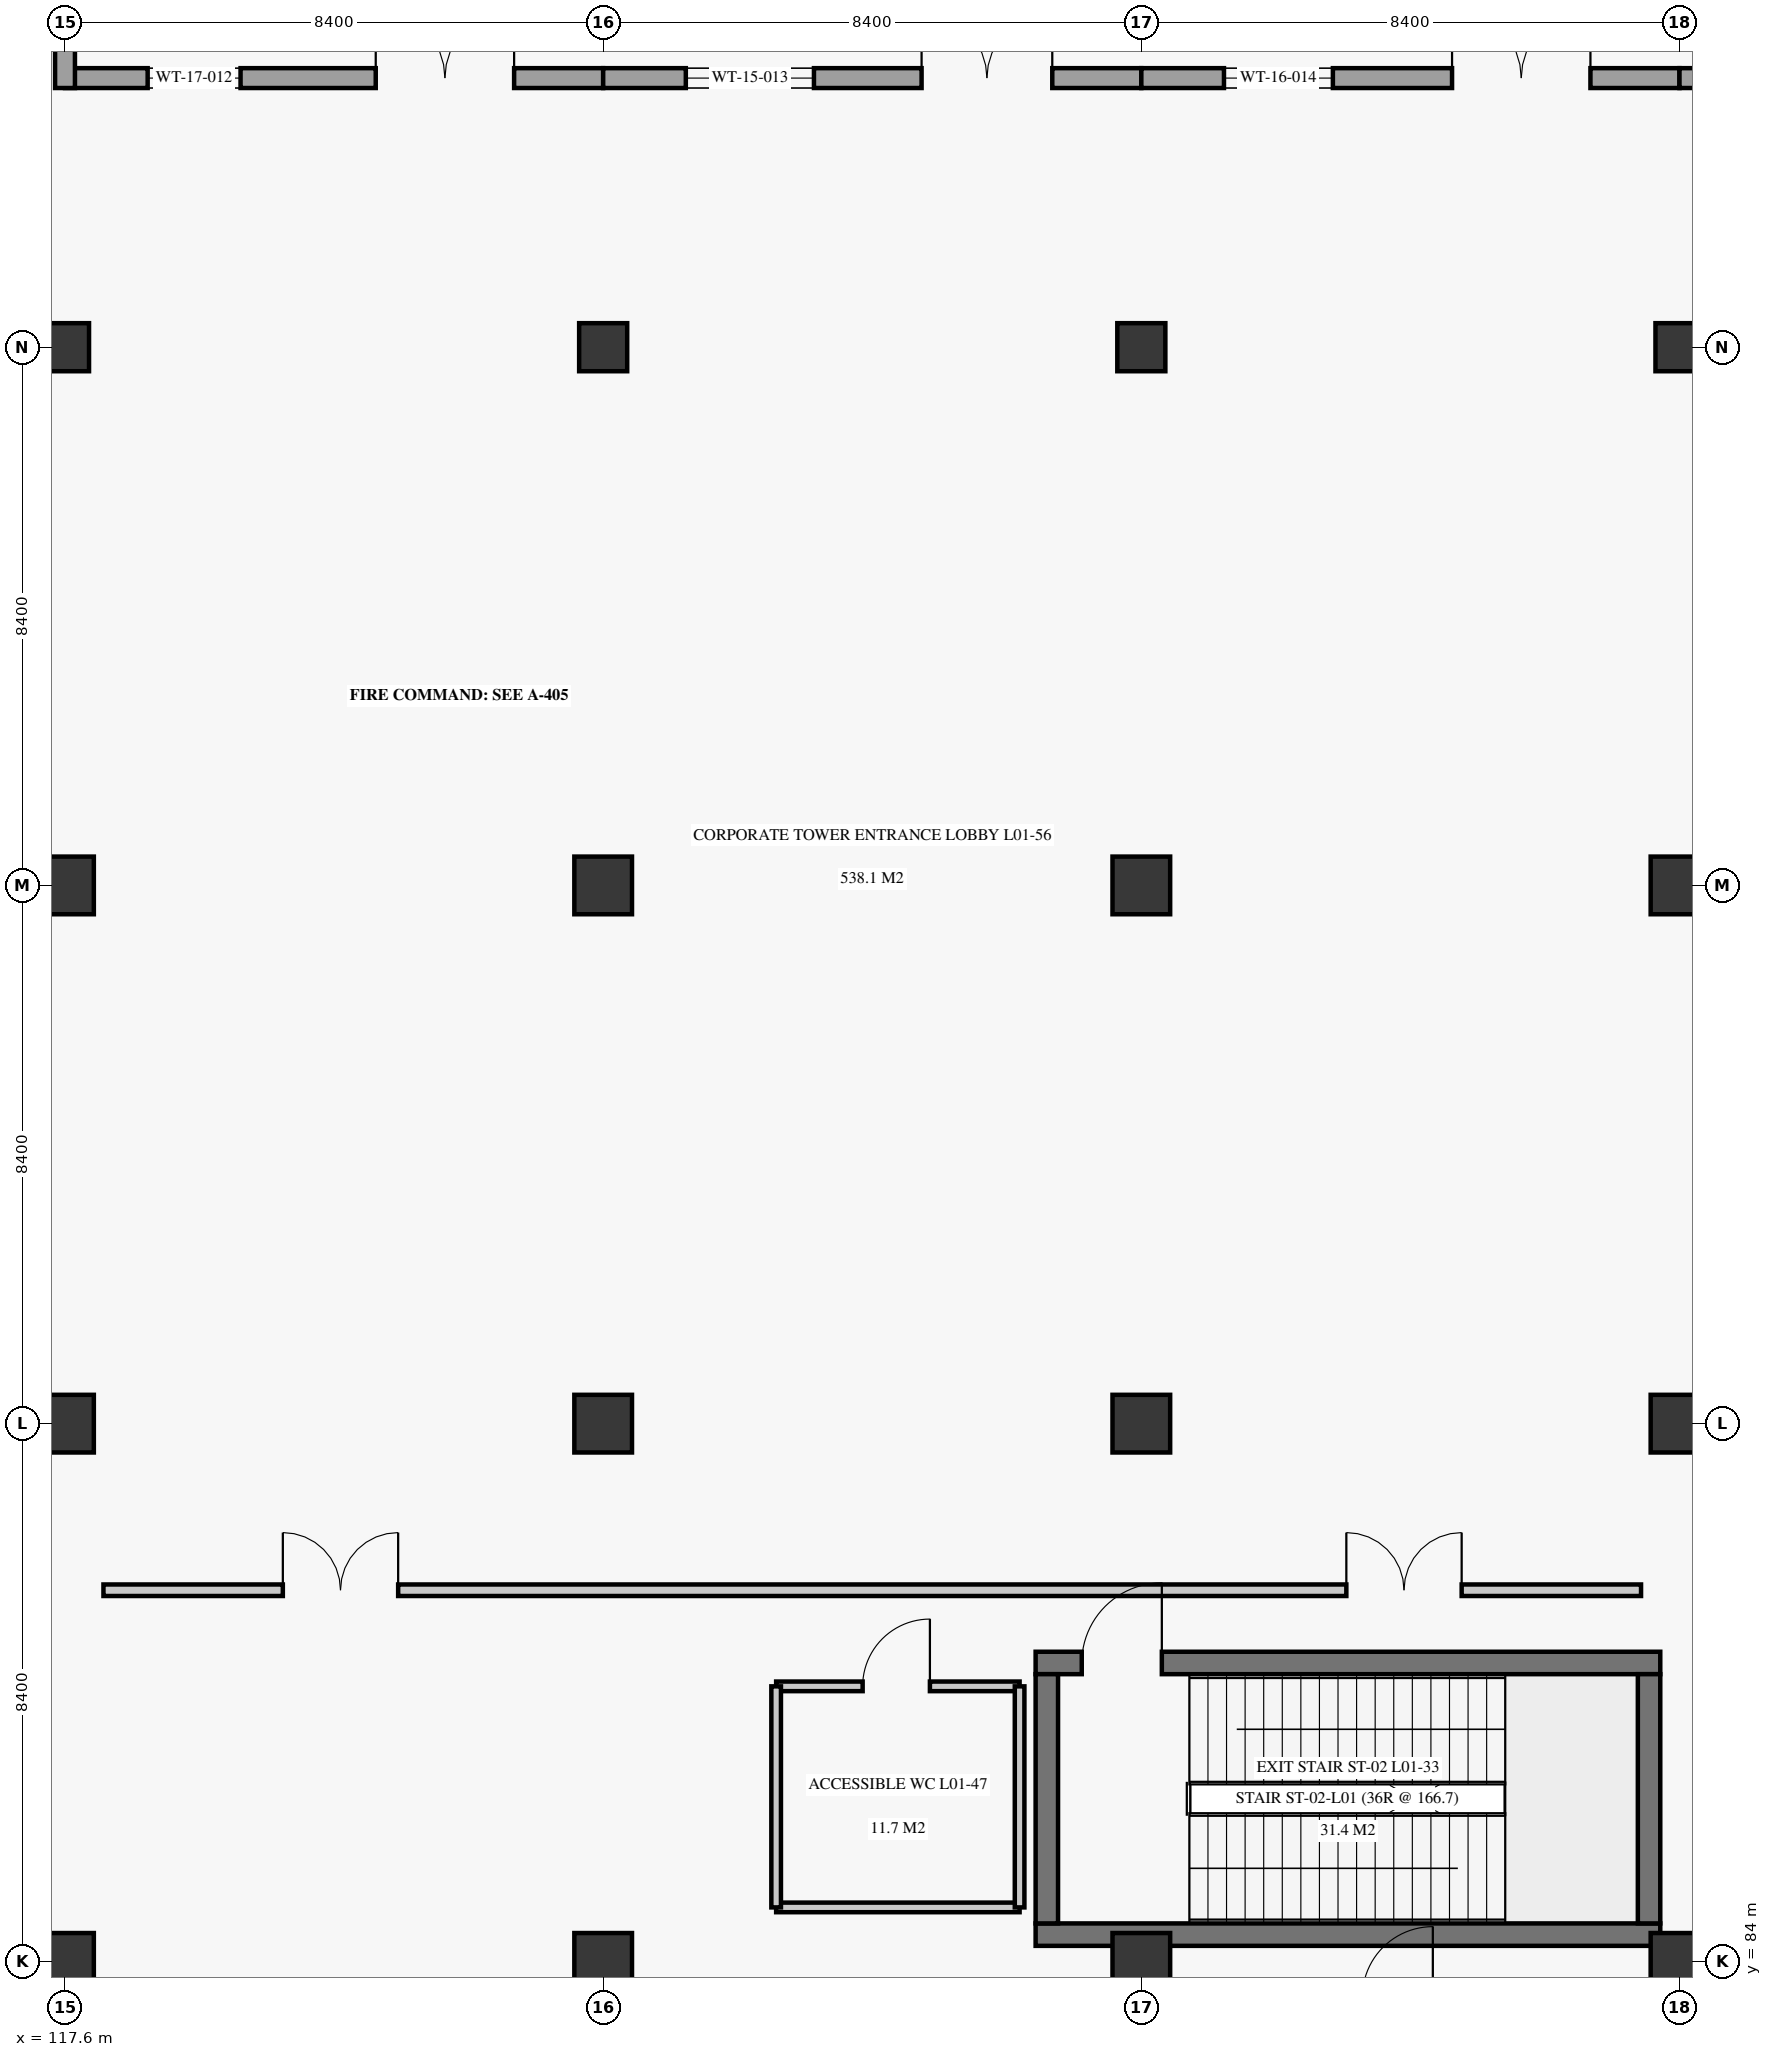
"""IFC4 building model, lengths in metres.
Left out: names, types, materials, properties, quantities, classifications, styles, units other than length and angle.
Written with IfcOpenShell. Run it as: python <this file> out.ifc"""

import sys

from ifc_helpers import new_model, si_unit, direction, frame, frame_2d, origin, origin_2d, place, context, subcontext, project, spatial, rectangle, extrude, element, fill, save


model = new_model("IFC4")
c1 = context("Model", 3, precision=1e-05, world=origin(), true_north=direction((0.0, 1.0)))
c2 = subcontext(c1, "Body", "Model", "MODEL_VIEW")
j1 = project(units=[si_unit("LENGTHUNIT", "METRE"), si_unit("PLANEANGLEUNIT", "RADIAN")], contexts=[c1])
p1 = place(None, origin())
s1 = spatial("IfcSite", under=j1, at=p1, CompositionType="ELEMENT")
p2 = place(p1, origin())
s2 = spatial("IfcBuilding", under=s1, at=p2, CompositionType="ELEMENT")
p3 = place(p2, origin())
s3 = spatial("IfcBuildingStorey", under=s2, at=p3, CompositionType="ELEMENT", Elevation=0.0)
for number, where, z_axis, x_axis in (
    (1, (117.6, 84.0, 0.0), (0.0, 0.0, 1.0), (1.0, 0.0, 0.0)),
    (2, (117.6, 92.4, 0.0), (0.0, 0.0, 1.0), (1.0, 0.0, 0.0)),
    (3, (117.6, 100.8, 0.0), (0.0, 0.0, 1.0), (1.0, 0.0, 0.0)),
):
    element("IfcColumn", number, at=place(p3, frame(where, z_axis=z_axis, x_axis=x_axis)), inside=s3, PredefinedType="COLUMN", context=c2, shape_type="SweptSolid", body=[
        extrude(rectangle(XDim=0.9, YDim=0.9, at=origin_2d()), origin(), (0.0, 0.0, 1.0), 5.7),
    ])
p4 = place(p3, frame((117.6, 109.2, 0.0), z_axis=(0.0, 0.0, 1.0), x_axis=(1.0, 0.0, 0.0)))
e4 = element("IfcColumn", 4, at=p4, inside=s3, PredefinedType="COLUMN", context=c2, shape_type="SweptSolid", body=[
    extrude(rectangle(XDim=0.75, YDim=0.75, at=origin_2d()), origin(), (0.0, 0.0, 1.0), 5.7),
])
for number, where, z_axis, x_axis in (
    (5, (126.0, 84.0, 0.0), (0.0, 0.0, 1.0), (1.0, 0.0, 0.0)),
    (6, (126.0, 92.4, 0.0), (0.0, 0.0, 1.0), (1.0, 0.0, 0.0)),
    (7, (126.0, 100.8, 0.0), (0.0, 0.0, 1.0), (1.0, 0.0, 0.0)),
):
    element("IfcColumn", number, at=place(p3, frame(where, z_axis=z_axis, x_axis=x_axis)), inside=s3, PredefinedType="COLUMN", context=c2, shape_type="SweptSolid", body=[
        extrude(rectangle(XDim=0.9, YDim=0.9, at=origin_2d()), origin(), (0.0, 0.0, 1.0), 5.7),
    ])
p5 = place(p3, frame((126.0, 109.2, 0.0), z_axis=(0.0, 0.0, 1.0), x_axis=(1.0, 0.0, 0.0)))
e8 = element("IfcColumn", 8, at=p5, inside=s3, PredefinedType="COLUMN", context=c2, shape_type="SweptSolid", body=[
    extrude(rectangle(XDim=0.75, YDim=0.75, at=origin_2d()), origin(), (0.0, 0.0, 1.0), 5.7),
])
for number, where, z_axis, x_axis in (
    (9, (134.4, 84.0, 0.0), (0.0, 0.0, 1.0), (1.0, 0.0, 0.0)),
    (10, (134.4, 92.4, 0.0), (0.0, 0.0, 1.0), (1.0, 0.0, 0.0)),
    (11, (134.4, 100.8, 0.0), (0.0, 0.0, 1.0), (1.0, 0.0, 0.0)),
):
    element("IfcColumn", number, at=place(p3, frame(where, z_axis=z_axis, x_axis=x_axis)), inside=s3, PredefinedType="COLUMN", context=c2, shape_type="SweptSolid", body=[
        extrude(rectangle(XDim=0.9, YDim=0.9, at=origin_2d()), origin(), (0.0, 0.0, 1.0), 5.7),
    ])
p6 = place(p3, frame((134.4, 109.2, 0.0), z_axis=(0.0, 0.0, 1.0), x_axis=(1.0, 0.0, 0.0)))
e12 = element("IfcColumn", 12, at=p6, inside=s3, PredefinedType="COLUMN", context=c2, shape_type="SweptSolid", body=[
    extrude(rectangle(XDim=0.75, YDim=0.75, at=origin_2d()), origin(), (0.0, 0.0, 1.0), 5.7),
])
for number, where, z_axis, x_axis in (
    (13, (142.8, 84.0, 0.0), (0.0, 0.0, 1.0), (1.0, 0.0, 0.0)),
    (14, (142.8, 92.4, 0.0), (0.0, 0.0, 1.0), (1.0, 0.0, 0.0)),
    (15, (142.8, 100.8, 0.0), (0.0, 0.0, 1.0), (1.0, 0.0, 0.0)),
):
    element("IfcColumn", number, at=place(p3, frame(where, z_axis=z_axis, x_axis=x_axis)), inside=s3, PredefinedType="COLUMN", context=c2, shape_type="SweptSolid", body=[
        extrude(rectangle(XDim=0.9, YDim=0.9, at=origin_2d()), origin(), (0.0, 0.0, 1.0), 5.7),
    ])
p7 = place(p3, frame((142.8, 109.2, 0.0), z_axis=(0.0, 0.0, 1.0), x_axis=(1.0, 0.0, 0.0)))
e16 = element("IfcColumn", 16, at=p7, inside=s3, PredefinedType="COLUMN", context=c2, shape_type="SweptSolid", body=[
    extrude(rectangle(XDim=0.75, YDim=0.75, at=origin_2d()), origin(), (0.0, 0.0, 1.0), 5.7),
])
p8 = place(p3, frame((117.6, 113.4, 0.0), z_axis=(0.0, 0.0, 1.0), x_axis=(1.0, 0.0, 0.0)))
e17 = element("IfcWall", 17, at=p8, inside=s3, PredefinedType="SOLIDWALL", context=c2, shape_type="SweptSolid", body=[
    extrude(rectangle(XDim=8.4, YDim=0.31, at=frame_2d((4.2, 0.0))), origin(), (0.0, 0.0, 1.0), 4.98),
])
p9 = place(p8, frame((1.29, 0.0, 1.05)))
e18 = element("IfcOpeningElement", 18, at=p9, cuts=e17, PredefinedType="OPENING", context=c2, shape_type="SweptSolid", body=[
    extrude(rectangle(XDim=1.45, YDim=1.8, at=frame_2d((0.725, 0.9))), frame((0.0, 0.165, 0.0), z_axis=(0.0, -1.0, 0.0), x_axis=(1.0, 0.0, 0.0)), (0.0, 0.0, 1.0), 0.33),
])
p10 = place(p8, frame((4.85, 0.0, 0.0)))
e19 = element("IfcOpeningElement", 19, at=p10, cuts=e17, PredefinedType="OPENING", context=c2, shape_type="SweptSolid", body=[
    extrude(rectangle(XDim=2.16, YDim=2.6, at=frame_2d((1.08, 1.3))), frame((0.0, 0.165, 0.0), z_axis=(0.0, -1.0, 0.0), x_axis=(1.0, 0.0, 0.0)), (0.0, 0.0, 1.0), 0.33),
])
p11 = place(p3, frame((117.6, 113.245, 0.0), z_axis=(0.0, 0.0, 1.0), x_axis=(0.0, 1.0, 0.0)))
e20 = element("IfcWall", 20, at=p11, inside=s3, PredefinedType="SOLIDWALL", context=c2, shape_type="SweptSolid", body=[
    extrude(rectangle(XDim=4.048, YDim=0.31, at=frame_2d((2.024, 0.0))), origin(), (0.0, 0.0, 1.0), 4.98),
])
p12 = place(p3, frame((126.0, 113.4, 0.0), z_axis=(0.0, 0.0, 1.0), x_axis=(1.0, 0.0, 0.0)))
e21 = element("IfcWall", 21, at=p12, inside=s3, PredefinedType="SOLIDWALL", context=c2, shape_type="SweptSolid", body=[
    extrude(rectangle(XDim=8.4, YDim=0.31, at=frame_2d((4.2, 0.0))), origin(), (0.0, 0.0, 1.0), 4.98),
])
p13 = place(p12, frame((1.29, 0.0, 1.05)))
e22 = element("IfcOpeningElement", 22, at=p13, cuts=e21, PredefinedType="OPENING", context=c2, shape_type="SweptSolid", body=[
    extrude(rectangle(XDim=2.0, YDim=2.0, at=frame_2d((1.0, 1.0))), frame((0.0, 0.165, 0.0), z_axis=(0.0, -1.0, 0.0), x_axis=(1.0, 0.0, 0.0)), (0.0, 0.0, 1.0), 0.33),
])
p14 = place(p12, frame((4.97, 0.0, 0.0)))
e23 = element("IfcOpeningElement", 23, at=p14, cuts=e21, PredefinedType="OPENING", context=c2, shape_type="SweptSolid", body=[
    extrude(rectangle(XDim=2.04, YDim=2.55, at=frame_2d((1.02, 1.275))), frame((0.0, 0.165, 0.0), z_axis=(0.0, -1.0, 0.0), x_axis=(1.0, 0.0, 0.0)), (0.0, 0.0, 1.0), 0.33),
])
p15 = place(p3, frame((134.4, 113.4, 0.0), z_axis=(0.0, 0.0, 1.0), x_axis=(1.0, 0.0, 0.0)))
e24 = element("IfcWall", 24, at=p15, inside=s3, PredefinedType="SOLIDWALL", context=c2, shape_type="SweptSolid", body=[
    extrude(rectangle(XDim=8.4, YDim=0.31, at=frame_2d((4.2, 0.0))), origin(), (0.0, 0.0, 1.0), 4.98),
])
p16 = place(p15, frame((1.29, 0.0, 1.05)))
e25 = element("IfcOpeningElement", 25, at=p16, cuts=e24, PredefinedType="OPENING", context=c2, shape_type="SweptSolid", body=[
    extrude(rectangle(XDim=1.7, YDim=1.95, at=frame_2d((0.85, 0.975))), frame((0.0, 0.165, 0.0), z_axis=(0.0, -1.0, 0.0), x_axis=(1.0, 0.0, 0.0)), (0.0, 0.0, 1.0), 0.33),
])
p17 = place(p15, frame((4.85, 0.0, 0.0)))
e26 = element("IfcOpeningElement", 26, at=p17, cuts=e24, PredefinedType="OPENING", context=c2, shape_type="SweptSolid", body=[
    extrude(rectangle(XDim=2.16, YDim=2.6, at=frame_2d((1.08, 1.3))), frame((0.0, 0.165, 0.0), z_axis=(0.0, -1.0, 0.0), x_axis=(1.0, 0.0, 0.0)), (0.0, 0.0, 1.0), 0.33),
])
p18 = place(p3, frame((142.8, 113.4, 0.0), z_axis=(0.0, 0.0, 1.0), x_axis=(1.0, 0.0, 0.0)))
e27 = element("IfcWall", 27, at=p18, inside=s3, PredefinedType="SOLIDWALL", context=c2, shape_type="SweptSolid", body=[
    extrude(rectangle(XDim=8.4, YDim=0.31, at=frame_2d((4.2, 0.0))), origin(), (0.0, 0.0, 1.0), 4.98),
])
p19 = place(p18, frame((1.29, 0.0, 1.05)))
e28 = element("IfcOpeningElement", 28, at=p19, cuts=e27, PredefinedType="OPENING", context=c2, shape_type="SweptSolid", body=[
    extrude(rectangle(XDim=1.45, YDim=1.8, at=frame_2d((0.725, 0.9))), frame((0.0, 0.165, 0.0), z_axis=(0.0, -1.0, 0.0), x_axis=(1.0, 0.0, 0.0)), (0.0, 0.0, 1.0), 0.33),
])
p20 = place(p18, frame((4.97, 0.0, 0.0)))
e29 = element("IfcOpeningElement", 29, at=p20, cuts=e27, PredefinedType="OPENING", context=c2, shape_type="SweptSolid", body=[
    extrude(rectangle(XDim=2.04, YDim=2.55, at=frame_2d((1.02, 1.275))), frame((0.0, 0.165, 0.0), z_axis=(0.0, -1.0, 0.0), x_axis=(1.0, 0.0, 0.0)), (0.0, 0.0, 1.0), 0.33),
])
p21 = place(p3, frame((132.75, 84.425, 0.0), z_axis=(0.0, 0.0, 1.0), x_axis=(1.0, 0.0, 0.0)))
e30 = element("IfcWall", 30, at=p21, inside=s3, PredefinedType="SHEAR", context=c2, shape_type="SweptSolid", body=[
    extrude(rectangle(XDim=9.75, YDim=0.35, at=frame_2d((4.875, 0.0))), origin(), (0.0, 0.0, 1.0), 5.7),
])
p22 = place(p3, frame((132.75, 88.665, 0.0), z_axis=(0.0, 0.0, 1.0), x_axis=(1.0, 0.0, 0.0)))
e31 = element("IfcWall", 31, at=p22, inside=s3, PredefinedType="SHEAR", context=c2, shape_type="SweptSolid", body=[
    extrude(rectangle(XDim=9.75, YDim=0.35, at=frame_2d((4.875, 0.0))), origin(), (0.0, 0.0, 1.0), 5.7),
])
p23 = place(p22, frame((0.72, 0.0, 0.0)))
e32 = element("IfcOpeningElement", 32, at=p23, cuts=e31, PredefinedType="OPENING", context=c2, shape_type="SweptSolid", body=[
    extrude(rectangle(XDim=1.25, YDim=2.2, at=frame_2d((0.625, 1.1))), frame((0.0, 0.185, 0.0), z_axis=(0.0, -1.0, 0.0), x_axis=(1.0, 0.0, 0.0)), (0.0, 0.0, 1.0), 0.37),
])
for number, where, z_axis, x_axis in (
    (33, (132.925, 84.6, 0.0), (0.0, 0.0, 1.0), (0.0, 1.0, 0.0)),
    (34, (142.325, 84.6, 0.0), (0.0, 0.0, 1.0), (0.0, 1.0, 0.0)),
):
    element("IfcWall", number, at=place(p3, frame(where, z_axis=z_axis, x_axis=x_axis)), inside=s3, PredefinedType="SHEAR", context=c2, shape_type="SweptSolid", body=[
        extrude(rectangle(XDim=3.89, YDim=0.35, at=frame_2d((1.945, 0.0))), origin(), (0.0, 0.0, 1.0), 5.7),
    ])
p24 = place(p3, frame((128.7, 88.3, 0.0), z_axis=(0.0, 0.0, 1.0), x_axis=(1.0, 0.0, 0.0)))
e35 = element("IfcWall", 35, at=p24, inside=s3, PredefinedType="PARTITIONING", context=c2, shape_type="SweptSolid", body=[
    extrude(rectangle(XDim=3.8, YDim=0.15, at=frame_2d((1.9, 0.0))), origin(), (0.0, 0.0, 1.0), 5.32),
])
p25 = place(p24, frame((1.35, 0.0, 0.0)))
e36 = element("IfcOpeningElement", 36, at=p25, cuts=e35, PredefinedType="OPENING", context=c2, shape_type="SweptSolid", body=[
    extrude(rectangle(XDim=1.05, YDim=2.15, at=frame_2d((0.525, 1.075))), frame((0.0, 0.085, 0.0), z_axis=(0.0, -1.0, 0.0), x_axis=(1.0, 0.0, 0.0)), (0.0, 0.0, 1.0), 0.17),
])
p26 = place(p3, frame((128.7, 84.85, 0.0), z_axis=(0.0, 0.0, 1.0), x_axis=(1.0, 0.0, 0.0)))
e37 = element("IfcWall", 37, at=p26, inside=s3, PredefinedType="PARTITIONING", context=c2, shape_type="SweptSolid", body=[
    extrude(rectangle(XDim=3.8, YDim=0.15, at=frame_2d((1.9, 0.0))), origin(), (0.0, 0.0, 1.0), 5.32),
])
for number, where, z_axis, x_axis in (
    (38, (128.7, 84.85, 0.0), (0.0, 0.0, 1.0), (0.0, 1.0, 0.0)),
    (39, (132.5, 84.85, 0.0), (0.0, 0.0, 1.0), (0.0, 1.0, 0.0)),
):
    element("IfcWall", number, at=place(p3, frame(where, z_axis=z_axis, x_axis=x_axis)), inside=s3, PredefinedType="PARTITIONING", context=c2, shape_type="SweptSolid", body=[
        extrude(rectangle(XDim=3.45, YDim=0.15, at=frame_2d((1.725, 0.0))), origin(), (0.0, 0.0, 1.0), 5.32),
    ])
p27 = place(p3, frame((118.2, 89.8, 0.0), z_axis=(0.0, 0.0, 1.0), x_axis=(1.0, 0.0, 0.0)))
e40 = element("IfcWall", 40, at=p27, inside=s3, PredefinedType="PARTITIONING", context=c2, shape_type="SweptSolid", body=[
    extrude(rectangle(XDim=24.0, YDim=0.18, at=frame_2d((12.0, 0.0))), origin(), (0.0, 0.0, 1.0), 5.32),
])
p28 = place(p27, frame((2.8, 0.0, 0.0)))
e41 = element("IfcOpeningElement", 41, at=p28, cuts=e40, PredefinedType="OPENING", context=c2, shape_type="SweptSolid", body=[
    extrude(rectangle(XDim=1.8, YDim=2.55, at=frame_2d((0.9, 1.275))), frame((0.0, 0.1, 0.0), z_axis=(0.0, -1.0, 0.0), x_axis=(1.0, 0.0, 0.0)), (0.0, 0.0, 1.0), 0.2),
])
p29 = place(p27, frame((19.4, 0.0, 0.0)))
e42 = element("IfcOpeningElement", 42, at=p29, cuts=e40, PredefinedType="OPENING", context=c2, shape_type="SweptSolid", body=[
    extrude(rectangle(XDim=1.8, YDim=2.55, at=frame_2d((0.9, 1.275))), frame((0.0, 0.1, 0.0), z_axis=(0.0, -1.0, 0.0), x_axis=(1.0, 0.0, 0.0)), (0.0, 0.0, 1.0), 0.2),
])
p30 = place(p9, origin())
e43 = element("IfcWindow", 43, at=p30, inside=s3, PartitioningType="SINGLE_PANEL", PredefinedType="WINDOW", context=c2, shape_type="SweptSolid", body=[
    extrude(rectangle(XDim=1.45, YDim=1.8, at=frame_2d((0.725, 0.9))), frame((0.0, 0.03, 0.0), z_axis=(0.0, -1.0, 0.0), x_axis=(1.0, 0.0, 0.0)), (0.0, 0.0, 1.0), 0.06),
])
fill(e18, e43)
p31 = place(p10, origin())
e44 = element("IfcDoor", 44, at=p31, inside=s3, OperationType="DOUBLE_DOOR_SINGLE_SWING", PredefinedType="DOOR", context=c2, shape_type="SweptSolid", body=[
    extrude(rectangle(XDim=2.16, YDim=2.6, at=frame_2d((1.08, 1.3))), frame((0.0, 0.025, 0.0), z_axis=(0.0, -1.0, 0.0), x_axis=(1.0, 0.0, 0.0)), (0.0, 0.0, 1.0), 0.05),
])
fill(e19, e44)
p32 = place(p13, origin())
e45 = element("IfcWindow", 45, at=p32, inside=s3, PartitioningType="SINGLE_PANEL", PredefinedType="WINDOW", context=c2, shape_type="SweptSolid", body=[
    extrude(rectangle(XDim=2.0, YDim=2.0, at=frame_2d((1.0, 1.0))), frame((0.0, 0.03, 0.0), z_axis=(0.0, -1.0, 0.0), x_axis=(1.0, 0.0, 0.0)), (0.0, 0.0, 1.0), 0.06),
])
fill(e22, e45)
p33 = place(p14, origin())
e46 = element("IfcDoor", 46, at=p33, inside=s3, OperationType="DOUBLE_DOOR_SINGLE_SWING", PredefinedType="DOOR", context=c2, shape_type="SweptSolid", body=[
    extrude(rectangle(XDim=2.04, YDim=2.55, at=frame_2d((1.02, 1.275))), frame((0.0, 0.025, 0.0), z_axis=(0.0, -1.0, 0.0), x_axis=(1.0, 0.0, 0.0)), (0.0, 0.0, 1.0), 0.05),
])
fill(e23, e46)
p34 = place(p16, origin())
e47 = element("IfcWindow", 47, at=p34, inside=s3, PartitioningType="SINGLE_PANEL", PredefinedType="WINDOW", context=c2, shape_type="SweptSolid", body=[
    extrude(rectangle(XDim=1.7, YDim=1.95, at=frame_2d((0.85, 0.975))), frame((0.0, 0.03, 0.0), z_axis=(0.0, -1.0, 0.0), x_axis=(1.0, 0.0, 0.0)), (0.0, 0.0, 1.0), 0.06),
])
fill(e25, e47)
p35 = place(p17, origin())
e48 = element("IfcDoor", 48, at=p35, inside=s3, OperationType="DOUBLE_DOOR_SINGLE_SWING", PredefinedType="DOOR", context=c2, shape_type="SweptSolid", body=[
    extrude(rectangle(XDim=2.16, YDim=2.6, at=frame_2d((1.08, 1.3))), frame((0.0, 0.025, 0.0), z_axis=(0.0, -1.0, 0.0), x_axis=(1.0, 0.0, 0.0)), (0.0, 0.0, 1.0), 0.05),
])
fill(e26, e48)
p36 = place(p23, origin())
e49 = element("IfcDoor", 49, at=p36, inside=s3, OperationType="SINGLE_SWING_RIGHT", PredefinedType="DOOR", context=c2, shape_type="SweptSolid", body=[
    extrude(rectangle(XDim=1.25, YDim=2.2, at=frame_2d((0.625, 1.1))), frame((0.0, 0.025, 0.0), z_axis=(0.0, -1.0, 0.0), x_axis=(1.0, 0.0, 0.0)), (0.0, 0.0, 1.0), 0.05),
])
fill(e32, e49)
p37 = place(p25, origin())
e50 = element("IfcDoor", 50, at=p37, inside=s3, OperationType="SINGLE_SWING_RIGHT", PredefinedType="DOOR", context=c2, shape_type="SweptSolid", body=[
    extrude(rectangle(XDim=1.05, YDim=2.15, at=frame_2d((0.525, 1.075))), frame((0.0, 0.025, 0.0), z_axis=(0.0, -1.0, 0.0), x_axis=(1.0, 0.0, 0.0)), (0.0, 0.0, 1.0), 0.05),
])
fill(e36, e50)
p38 = place(p28, origin())
e51 = element("IfcDoor", 51, at=p38, inside=s3, OperationType="DOUBLE_DOOR_SINGLE_SWING", PredefinedType="DOOR", context=c2, shape_type="SweptSolid", body=[
    extrude(rectangle(XDim=1.8, YDim=2.55, at=frame_2d((0.9, 1.275))), frame((0.0, 0.025, 0.0), z_axis=(0.0, -1.0, 0.0), x_axis=(1.0, 0.0, 0.0)), (0.0, 0.0, 1.0), 0.05),
])
fill(e41, e51)
p39 = place(p29, origin())
e52 = element("IfcDoor", 52, at=p39, inside=s3, OperationType="DOUBLE_DOOR_SINGLE_SWING", PredefinedType="DOOR", context=c2, shape_type="SweptSolid", body=[
    extrude(rectangle(XDim=1.8, YDim=2.55, at=frame_2d((0.9, 1.275))), frame((0.0, 0.025, 0.0), z_axis=(0.0, -1.0, 0.0), x_axis=(1.0, 0.0, 0.0)), (0.0, 0.0, 1.0), 0.05),
])
fill(e42, e52)
save(model, sys.argv[1])
